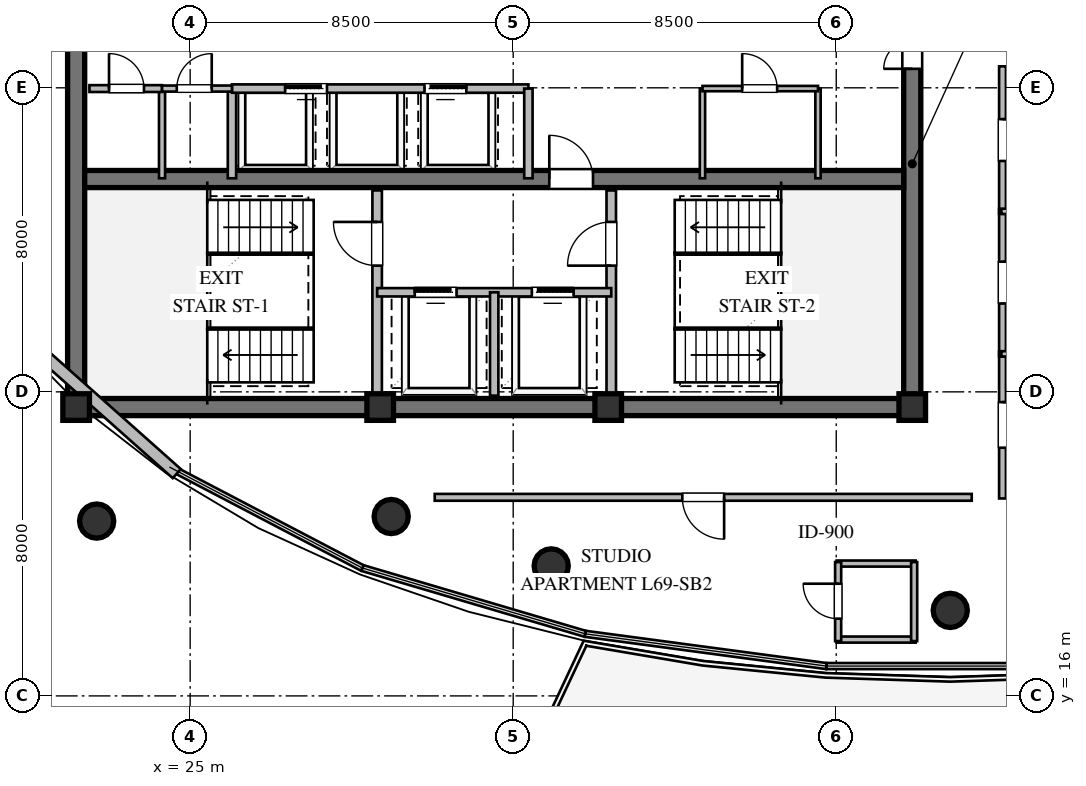
"""IFC4 building model, lengths in metres.
Left out: names, types, materials, properties, quantities, classifications, styles, units other than length and angle.
Written with IfcOpenShell. Run it as: python <this file> out.ifc"""

import sys

from ifc_helpers import new_model, si_unit, direction, frame, frame_2d, origin, origin_2d, place, context, subcontext, project, spatial, rectangle, circle, extrude, element, fill, save


model = new_model("IFC4")
c1 = context("Model", 3, precision=1e-05, world=origin(), true_north=direction((0.0, 1.0)))
c2 = subcontext(c1, "Body", "Model", "MODEL_VIEW")
j1 = project(units=[si_unit("LENGTHUNIT", "METRE"), si_unit("PLANEANGLEUNIT", "RADIAN")], contexts=[c1])
p1 = place(None, origin())
s1 = spatial("IfcSite", under=j1, at=p1, CompositionType="ELEMENT")
p2 = place(p1, origin())
s2 = spatial("IfcBuilding", under=s1, at=p2, CompositionType="ELEMENT")
p3 = place(p2, frame((0.0, 0.0, 262.4)))
s3 = spatial("IfcBuildingStorey", under=s2, at=p3, CompositionType="ELEMENT", Elevation=262.4)
p4 = place(p3, frame((21.775, 23.6, 0.0), z_axis=(0.0, 0.0, 1.0), x_axis=(1.0, 0.0, 0.0)))
e1 = element("IfcWall", 1, at=p4, inside=s3, PredefinedType="SHEAR", context=c2, shape_type="SweptSolid", body=[
    extrude(rectangle(XDim=22.45, YDim=0.45, at=frame_2d((11.225, 0.0))), origin(), (0.0, 0.0, 1.0), 3.56),
])
p5 = place(p3, frame((22.0, 23.825, 0.0), z_axis=(0.0, 0.0, 1.0), x_axis=(0.0, 1.0, 0.0)))
e2 = element("IfcWall", 2, at=p5, inside=s3, PredefinedType="SHEAR", context=c2, shape_type="SweptSolid", body=[
    extrude(rectangle(XDim=12.35, YDim=0.45, at=frame_2d((6.175, 0.0))), origin(), (0.0, 0.0, 1.0), 3.56),
])
p6 = place(p3, frame((44.0, 23.825, 0.0), z_axis=(0.0, 0.0, 1.0), x_axis=(0.0, 1.0, 0.0)))
e3 = element("IfcWall", 3, at=p6, inside=s3, PredefinedType="SHEAR", context=c2, shape_type="SweptSolid", body=[
    extrude(rectangle(XDim=12.35, YDim=0.45, at=frame_2d((6.175, 0.0))), origin(), (0.0, 0.0, 1.0), 3.56),
])
p7 = place(p6, frame((8.675, 0.0, 0.0)))
e4 = element("IfcOpeningElement", 4, at=p7, cuts=e3, PredefinedType="OPENING", context=c2, shape_type="SweptSolid", body=[
    extrude(rectangle(XDim=1.5, YDim=2.15, at=frame_2d((0.75, 1.075))), frame((0.0, 0.235, 0.0), z_axis=(0.0, -1.0, 0.0), x_axis=(1.0, 0.0, 0.0)), (0.0, 0.0, 1.0), 0.47),
])
p8 = place(p3, frame((22.225, 29.6, 0.0), z_axis=(0.0, 0.0, 1.0), x_axis=(1.0, 0.0, 0.0)))
e5 = element("IfcWall", 5, at=p8, inside=s3, PredefinedType="SHEAR", context=c2, shape_type="SweptSolid", body=[
    extrude(rectangle(XDim=21.55, YDim=0.45, at=frame_2d((10.775, 0.0))), origin(), (0.0, 0.0, 1.0), 3.56),
])
p9 = place(p8, frame((12.225, 0.0, 0.0)))
e6 = element("IfcOpeningElement", 6, at=p9, cuts=e5, PredefinedType="OPENING", context=c2, shape_type="SweptSolid", body=[
    extrude(rectangle(XDim=1.15, YDim=2.1, at=frame_2d((0.575, 1.05))), frame((0.0, 0.235, 0.0), z_axis=(0.0, -1.0, 0.0), x_axis=(1.0, 0.0, 0.0)), (0.0, 0.0, 1.0), 0.47),
])
for number, where, z_axis, x_axis in (
    (7, (22.0, 23.6, 0.0), (0.0, 0.0, 1.0), (1.0, 0.0, 0.0)),
    (8, (30.0, 23.6, 0.0), (0.0, 0.0, 1.0), (1.0, 0.0, 0.0)),
    (9, (36.0, 23.6, 0.0), (0.0, 0.0, 1.0), (1.0, 0.0, 0.0)),
    (10, (44.0, 23.6, 0.0), (0.0, 0.0, 1.0), (1.0, 0.0, 0.0)),
):
    element("IfcColumn", number, at=place(p3, frame(where, z_axis=z_axis, x_axis=x_axis)), inside=s3, PredefinedType="COLUMN", context=c2, shape_type="SweptSolid", body=[
        extrude(rectangle(XDim=0.7, YDim=0.7, at=origin_2d()), origin(), (0.0, 0.0, 1.0), 3.8),
    ])
for number, where, z_axis, x_axis in (
    (11, (22.54, 20.6, 0.0), (0.0, 0.0, 1.0), (1.0, 0.0, 0.0)),
    (12, (30.29, 20.72, 0.0), (0.0, 0.0, 1.0), (1.0, 0.0, 0.0)),
    (13, (34.5, 19.42, 0.0), (0.0, 0.0, 1.0), (1.0, 0.0, 0.0)),
    (14, (45.0, 18.25, 0.0), (0.0, 0.0, 1.0), (1.0, 0.0, 0.0)),
):
    element("IfcColumn", number, at=place(p3, frame(where, z_axis=z_axis, x_axis=x_axis)), inside=s3, PredefinedType="COLUMN", context=c2, shape_type="SweptSolid", body=[
        extrude(circle(Radius=0.45, at=origin_2d()), origin(), (0.0, 0.0, 1.0), 3.8),
    ])
p10 = place(p3, frame((24.648, 21.849, 0.0), z_axis=(0.0, 0.0, 1.0), x_axis=(-0.747068410291, 0.664747162721, 0.0)))
e15 = element("IfcWall", 15, at=p10, inside=s3, PredefinedType="STANDARD", context=c2, shape_type="SweptSolid", body=[
    extrude(rectangle(XDim=5.928, YDim=0.32, at=frame_2d((2.964, 0.0))), origin(), (0.0, 0.0, 1.0), 2.35),
])
p11 = place(p3, frame((29.92, 23.9, 0.0), z_axis=(0.0, 0.0, 1.0), x_axis=(0.0, 1.0, 0.0)))
e16 = element("IfcWall", 16, at=p11, inside=s3, PredefinedType="SOLIDWALL", context=c2, shape_type="SweptSolid", body=[
    extrude(rectangle(XDim=5.4, YDim=0.25, at=frame_2d((2.7, 0.0))), origin(), (0.0, 0.0, 1.0), 3.09),
])
p12 = place(p11, frame((3.421, 0.0, 0.0)))
e17 = element("IfcOpeningElement", 17, at=p12, cuts=e16, PredefinedType="OPENING", context=c2, shape_type="SweptSolid", body=[
    extrude(rectangle(XDim=1.15, YDim=2.1, at=frame_2d((0.575, 1.05))), frame((0.0, 0.135, 0.0), z_axis=(0.0, -1.0, 0.0), x_axis=(1.0, 0.0, 0.0)), (0.0, 0.0, 1.0), 0.27),
])
p13 = place(p3, frame((36.08, 23.9, 0.0), z_axis=(0.0, 0.0, 1.0), x_axis=(0.0, 1.0, 0.0)))
e18 = element("IfcWall", 18, at=p13, inside=s3, PredefinedType="SOLIDWALL", context=c2, shape_type="SweptSolid", body=[
    extrude(rectangle(XDim=5.4, YDim=0.25, at=frame_2d((2.7, 0.0))), origin(), (0.0, 0.0, 1.0), 3.56),
])
p14 = place(p13, frame((3.421, 0.0, 0.0)))
e19 = element("IfcOpeningElement", 19, at=p14, cuts=e18, PredefinedType="OPENING", context=c2, shape_type="SweptSolid", body=[
    extrude(rectangle(XDim=1.15, YDim=2.1, at=frame_2d((0.575, 1.05))), frame((0.0, 0.135, 0.0), z_axis=(0.0, -1.0, 0.0), x_axis=(1.0, 0.0, 0.0)), (0.0, 0.0, 1.0), 0.27),
])
p15 = place(p3, frame((29.92, 26.62, 0.0), z_axis=(0.0, 0.0, 1.0), x_axis=(1.0, 0.0, 0.0)))
e20 = element("IfcWall", 20, at=p15, inside=s3, PredefinedType="SOLIDWALL", context=c2, shape_type="SweptSolid", body=[
    extrude(rectangle(XDim=6.16, YDim=0.22, at=frame_2d((3.08, 0.0))), origin(), (0.0, 0.0, 1.0), 3.56),
])
p16 = place(p15, frame((0.99, 0.0, 0.0)))
e21 = element("IfcOpeningElement", 21, at=p16, cuts=e20, PredefinedType="OPENING", context=c2, shape_type="SweptSolid", body=[
    extrude(rectangle(XDim=1.1, YDim=2.1, at=frame_2d((0.55, 1.05))), frame((0.0, 0.12, 0.0), z_axis=(0.0, -1.0, 0.0), x_axis=(1.0, 0.0, 0.0)), (0.0, 0.0, 1.0), 0.24),
])
p17 = place(p15, frame((4.07, 0.0, 0.0)))
e22 = element("IfcOpeningElement", 22, at=p17, cuts=e20, PredefinedType="OPENING", context=c2, shape_type="SweptSolid", body=[
    extrude(rectangle(XDim=1.1, YDim=2.1, at=frame_2d((0.55, 1.05))), frame((0.0, 0.12, 0.0), z_axis=(0.0, -1.0, 0.0), x_axis=(1.0, 0.0, 0.0)), (0.0, 0.0, 1.0), 0.24),
])
p18 = place(p3, frame((33.0, 23.9, 0.0), z_axis=(0.0, 0.0, 1.0), x_axis=(0.0, 1.0, 0.0)))
e23 = element("IfcWall", 23, at=p18, inside=s3, PredefinedType="SOLIDWALL", context=c2, shape_type="SweptSolid", body=[
    extrude(rectangle(XDim=2.72, YDim=0.22, at=frame_2d((1.36, 0.0))), origin(), (0.0, 0.0, 1.0), 3.56),
])
p19 = place(p3, frame((26.1, 29.62, 0.0), z_axis=(0.0, 0.0, 1.0), x_axis=(0.0, 1.0, 0.0)))
e24 = element("IfcWall", 24, at=p19, inside=s3, PredefinedType="SOLIDWALL", context=c2, shape_type="SweptSolid", body=[
    extrude(rectangle(XDim=2.36, YDim=0.22, at=frame_2d((1.18, 0.0))), origin(), (0.0, 0.0, 1.0), 3.56),
])
p20 = place(p3, frame((26.1, 31.98, 0.0), z_axis=(0.0, 0.0, 1.0), x_axis=(1.0, 0.0, 0.0)))
e25 = element("IfcWall", 25, at=p20, inside=s3, PredefinedType="SOLIDWALL", context=c2, shape_type="SweptSolid", body=[
    extrude(rectangle(XDim=7.8, YDim=0.22, at=frame_2d((3.9, 0.0))), origin(), (0.0, 0.0, 1.0), 3.56),
])
p21 = place(p20, frame((1.4, 0.0, 0.0)))
e26 = element("IfcOpeningElement", 26, at=p21, cuts=e25, PredefinedType="OPENING", context=c2, shape_type="SweptSolid", body=[
    extrude(rectangle(XDim=1.1, YDim=2.1, at=frame_2d((0.55, 1.05))), frame((0.0, 0.12, 0.0), z_axis=(0.0, -1.0, 0.0), x_axis=(1.0, 0.0, 0.0)), (0.0, 0.0, 1.0), 0.24),
])
p22 = place(p20, frame((5.066, 0.0, 0.0)))
e27 = element("IfcOpeningElement", 27, at=p22, cuts=e25, PredefinedType="OPENING", context=c2, shape_type="SweptSolid", body=[
    extrude(rectangle(XDim=1.1, YDim=2.1, at=frame_2d((0.55, 1.05))), frame((0.0, 0.12, 0.0), z_axis=(0.0, -1.0, 0.0), x_axis=(1.0, 0.0, 0.0)), (0.0, 0.0, 1.0), 0.24),
])
p23 = place(p3, frame((33.9, 29.62, 0.0), z_axis=(0.0, 0.0, 1.0), x_axis=(0.0, 1.0, 0.0)))
e28 = element("IfcWall", 28, at=p23, inside=s3, PredefinedType="SOLIDWALL", context=c2, shape_type="SweptSolid", body=[
    extrude(rectangle(XDim=2.36, YDim=0.22, at=frame_2d((1.18, 0.0))), origin(), (0.0, 0.0, 1.0), 3.56),
])
p24 = place(p3, frame((24.26, 29.62, 0.0), z_axis=(0.0, 0.0, 1.0), x_axis=(0.0, 1.0, 0.0)))
e29 = element("IfcWall", 29, at=p24, inside=s3, PredefinedType="PLUMBINGWALL", context=c2, shape_type="SweptSolid", body=[
    extrude(rectangle(XDim=2.36, YDim=0.16, at=frame_2d((1.18, 0.0))), origin(), (0.0, 0.0, 1.0), 3.56),
])
p25 = place(p3, frame((22.35, 31.98, 0.0), z_axis=(0.0, 0.0, 1.0), x_axis=(1.0, 0.0, 0.0)))
e30 = element("IfcWall", 30, at=p25, inside=s3, PredefinedType="PARTITIONING", context=c2, shape_type="SweptSolid", body=[
    extrude(rectangle(XDim=1.91, YDim=0.18, at=frame_2d((0.955, 0.0))), origin(), (0.0, 0.0, 1.0), 3.56),
])
p26 = place(p25, frame((0.515, 0.0, 0.0)))
e31 = element("IfcOpeningElement", 31, at=p26, cuts=e30, PredefinedType="OPENING", context=c2, shape_type="SweptSolid", body=[
    extrude(rectangle(XDim=0.92, YDim=2.1, at=frame_2d((0.46, 1.05))), frame((0.0, 0.1, 0.0), z_axis=(0.0, -1.0, 0.0), x_axis=(1.0, 0.0, 0.0)), (0.0, 0.0, 1.0), 0.2),
])
p27 = place(p3, frame((24.26, 31.98, 0.0), z_axis=(0.0, 0.0, 1.0), x_axis=(1.0, 0.0, 0.0)))
e32 = element("IfcWall", 32, at=p27, inside=s3, PredefinedType="PLUMBINGWALL", context=c2, shape_type="SweptSolid", body=[
    extrude(rectangle(XDim=1.84, YDim=0.16, at=frame_2d((0.92, 0.0))), origin(), (0.0, 0.0, 1.0), 3.56),
])
p28 = place(p27, frame((0.388, 0.0, 0.0)))
e33 = element("IfcOpeningElement", 33, at=p28, cuts=e32, PredefinedType="OPENING", context=c2, shape_type="SweptSolid", body=[
    extrude(rectangle(XDim=0.92, YDim=2.1, at=frame_2d((0.46, 1.05))), frame((0.0, 0.09, 0.0), z_axis=(0.0, -1.0, 0.0), x_axis=(1.0, 0.0, 0.0)), (0.0, 0.0, 1.0), 0.18),
])
for number, where, z_axis, x_axis in (
    (34, (38.48, 29.62, 0.0), (0.0, 0.0, 1.0), (0.0, 1.0, 0.0)),
    (35, (41.52, 29.62, 0.0), (0.0, 0.0, 1.0), (0.0, 1.0, 0.0)),
):
    element("IfcWall", number, at=place(p3, frame(where, z_axis=z_axis, x_axis=x_axis)), inside=s3, PredefinedType="PARTITIONING", context=c2, shape_type="SweptSolid", body=[
        extrude(rectangle(XDim=2.36, YDim=0.14, at=frame_2d((1.18, 0.0))), origin(), (0.0, 0.0, 1.0), 3.56),
    ])
p29 = place(p3, frame((38.48, 31.98, 0.0), z_axis=(0.0, 0.0, 1.0), x_axis=(1.0, 0.0, 0.0)))
e36 = element("IfcWall", 36, at=p29, inside=s3, PredefinedType="PARTITIONING", context=c2, shape_type="SweptSolid", body=[
    extrude(rectangle(XDim=3.04, YDim=0.14, at=frame_2d((1.52, 0.0))), origin(), (0.0, 0.0, 1.0), 3.56),
])
p30 = place(p29, frame((1.045, 0.0, 0.0)))
e37 = element("IfcOpeningElement", 37, at=p30, cuts=e36, PredefinedType="OPENING", context=c2, shape_type="SweptSolid", body=[
    extrude(rectangle(XDim=0.92, YDim=2.1, at=frame_2d((0.46, 1.05))), frame((0.0, 0.08, 0.0), z_axis=(0.0, -1.0, 0.0), x_axis=(1.0, 0.0, 0.0)), (0.0, 0.0, 1.0), 0.16),
])
for number, where, z_axis, x_axis in (
    (38, (42.01, 17.482, 0.0), (0.0, 0.0, 1.0), (1.0, 0.0, 0.0)),
    (39, (42.01, 19.482, 0.0), (0.0, 0.0, 1.0), (1.0, 0.0, 0.0)),
):
    element("IfcWall", number, at=place(p3, frame(where, z_axis=z_axis, x_axis=x_axis)), inside=s3, PredefinedType="PLUMBINGWALL", context=c2, shape_type="SweptSolid", body=[
        extrude(rectangle(XDim=2.08, YDim=0.16, at=frame_2d((1.04, 0.0))), origin(), (0.0, 0.0, 1.0), 3.56),
    ])
p31 = place(p3, frame((42.05, 17.442, 0.0), z_axis=(0.0, 0.0, 1.0), x_axis=(0.0, 1.0, 0.0)))
e40 = element("IfcWall", 40, at=p31, inside=s3, PredefinedType="PLUMBINGWALL", context=c2, shape_type="SweptSolid", body=[
    extrude(rectangle(XDim=2.08, YDim=0.16, at=frame_2d((1.04, 0.0))), origin(), (0.0, 0.0, 1.0), 3.56),
])
p32 = place(p31, frame((0.59, 0.0, 0.0)))
e41 = element("IfcOpeningElement", 41, at=p32, cuts=e40, PredefinedType="OPENING", context=c2, shape_type="SweptSolid", body=[
    extrude(rectangle(XDim=0.92, YDim=2.1, at=frame_2d((0.46, 1.05))), frame((0.0, 0.09, 0.0), z_axis=(0.0, -1.0, 0.0), x_axis=(1.0, 0.0, 0.0)), (0.0, 0.0, 1.0), 0.18),
])
p33 = place(p3, frame((44.05, 17.442, 0.0), z_axis=(0.0, 0.0, 1.0), x_axis=(0.0, 1.0, 0.0)))
e42 = element("IfcWall", 42, at=p33, inside=s3, PredefinedType="PLUMBINGWALL", context=c2, shape_type="SweptSolid", body=[
    extrude(rectangle(XDim=2.08, YDim=0.16, at=frame_2d((1.04, 0.0))), origin(), (0.0, 0.0, 1.0), 3.56),
])
p34 = place(p3, frame((46.375, 25.065, 0.0), z_axis=(0.0, 0.0, 1.0), x_axis=(0.0, -1.0, 0.0)))
e43 = element("IfcWall", 43, at=p34, inside=s3, PredefinedType="PARTITIONING", context=c2, shape_type="SweptSolid", body=[
    extrude(rectangle(XDim=3.87, YDim=0.18, at=frame_2d((1.935, 0.0))), origin(), (0.0, 0.0, 1.0), 3.56),
])
p35 = place(p34, frame((1.335, 0.0, 0.0)))
e44 = element("IfcOpeningElement", 44, at=p35, cuts=e43, PredefinedType="OPENING", context=c2, shape_type="SweptSolid", body=[
    extrude(rectangle(XDim=1.2, YDim=2.15, at=frame_2d((0.6, 1.075))), frame((0.0, 0.1, 0.0), z_axis=(0.0, -1.0, 0.0), x_axis=(1.0, 0.0, 0.0)), (0.0, 0.0, 1.0), 0.2),
])
p36 = place(p3, frame((46.375, 28.815, 0.0), z_axis=(0.0, 0.0, 1.0), x_axis=(0.0, -1.0, 0.0)))
e45 = element("IfcWall", 45, at=p36, inside=s3, PredefinedType="PARTITIONING", context=c2, shape_type="SweptSolid", body=[
    extrude(rectangle(XDim=3.88, YDim=0.18, at=frame_2d((1.94, 0.0))), origin(), (0.0, 0.0, 1.0), 3.56),
])
p37 = place(p36, frame((1.39, 0.0, 0.0)))
e46 = element("IfcOpeningElement", 46, at=p37, cuts=e45, PredefinedType="OPENING", context=c2, shape_type="SweptSolid", body=[
    extrude(rectangle(XDim=1.1, YDim=2.1, at=frame_2d((0.55, 1.05))), frame((0.0, 0.1, 0.0), z_axis=(0.0, -1.0, 0.0), x_axis=(1.0, 0.0, 0.0)), (0.0, 0.0, 1.0), 0.2),
])
p38 = place(p3, frame((46.375, 32.565, 0.0), z_axis=(0.0, 0.0, 1.0), x_axis=(0.0, -1.0, 0.0)))
e47 = element("IfcWall", 47, at=p38, inside=s3, PredefinedType="PARTITIONING", context=c2, shape_type="SweptSolid", body=[
    extrude(rectangle(XDim=3.88, YDim=0.18, at=frame_2d((1.94, 0.0))), origin(), (0.0, 0.0, 1.0), 3.56),
])
p39 = place(p38, frame((1.39, 0.0, 0.0)))
e48 = element("IfcOpeningElement", 48, at=p39, cuts=e47, PredefinedType="OPENING", context=c2, shape_type="SweptSolid", body=[
    extrude(rectangle(XDim=1.1, YDim=2.1, at=frame_2d((0.55, 1.05))), frame((0.0, 0.1, 0.0), z_axis=(0.0, -1.0, 0.0), x_axis=(1.0, 0.0, 0.0)), (0.0, 0.0, 1.0), 0.2),
])
p40 = place(p3, frame((45.565, 21.225, 0.0), z_axis=(0.0, 0.0, 1.0), x_axis=(-1.0, 0.0, 0.0)))
e49 = element("IfcWall", 49, at=p40, inside=s3, PredefinedType="PARTITIONING", context=c2, shape_type="SweptSolid", body=[
    extrude(rectangle(XDim=14.13, YDim=0.18, at=frame_2d((7.065, 0.0))), origin(), (0.0, 0.0, 1.0), 3.196),
])
p41 = place(p40, frame((6.515, 0.0, 0.0)))
e50 = element("IfcOpeningElement", 50, at=p41, cuts=e49, PredefinedType="OPENING", context=c2, shape_type="SweptSolid", body=[
    extrude(rectangle(XDim=1.1, YDim=2.1, at=frame_2d((0.55, 1.05))), frame((0.0, 0.1, 0.0), z_axis=(0.0, -1.0, 0.0), x_axis=(1.0, 0.0, 0.0)), (0.0, 0.0, 1.0), 0.2),
])
p42 = place(p3, frame((46.345, 25.0, 0.0), z_axis=(0.0, 0.0, 1.0), x_axis=(1.0, 0.0, 0.0)))
e51 = element("IfcWall", 51, at=p42, inside=s3, PredefinedType="PARTITIONING", context=c2, shape_type="SweptSolid", body=[
    extrude(rectangle(XDim=22.539, YDim=0.14, at=frame_2d((11.269, 0.0))), origin(), (0.0, 0.0, 1.0), 3.56),
])
p43 = place(p3, frame((46.345, 28.75, 0.0), z_axis=(0.0, 0.0, 1.0), x_axis=(1.0, 0.0, 0.0)))
e52 = element("IfcWall", 52, at=p43, inside=s3, PredefinedType="PARTITIONING", context=c2, shape_type="SweptSolid", body=[
    extrude(rectangle(XDim=25.721, YDim=0.14, at=frame_2d((12.86, 0.0))), origin(), (0.0, 0.0, 1.0), 3.56),
])
p44 = place(p12, origin())
e53 = element("IfcDoor", 53, at=p44, inside=s3, OperationType="SINGLE_SWING_RIGHT", PredefinedType="DOOR", context=c2, shape_type="SweptSolid", body=[
    extrude(rectangle(XDim=1.15, YDim=2.1, at=frame_2d((0.575, 1.05))), frame((0.0, 0.025, 0.0), z_axis=(0.0, -1.0, 0.0), x_axis=(1.0, 0.0, 0.0)), (0.0, 0.0, 1.0), 0.05),
])
fill(e17, e53)
p45 = place(p14, origin())
e54 = element("IfcDoor", 54, at=p45, inside=s3, OperationType="SINGLE_SWING_LEFT", PredefinedType="DOOR", context=c2, shape_type="SweptSolid", body=[
    extrude(rectangle(XDim=1.15, YDim=2.1, at=frame_2d((0.575, 1.05))), frame((0.0, 0.025, 0.0), z_axis=(0.0, -1.0, 0.0), x_axis=(1.0, 0.0, 0.0)), (0.0, 0.0, 1.0), 0.05),
])
fill(e19, e54)
p46 = place(p16, origin())
e55 = element("IfcDoor", 55, at=p46, inside=s3, OperationType="SLIDING_TO_LEFT", PredefinedType="DOOR", context=c2, shape_type="SweptSolid", body=[
    extrude(rectangle(XDim=1.1, YDim=2.1, at=frame_2d((0.55, 1.05))), frame((0.0, 0.025, 0.0), z_axis=(0.0, -1.0, 0.0), x_axis=(1.0, 0.0, 0.0)), (0.0, 0.0, 1.0), 0.05),
])
fill(e21, e55)
p47 = place(p17, origin())
e56 = element("IfcDoor", 56, at=p47, inside=s3, OperationType="SLIDING_TO_RIGHT", PredefinedType="DOOR", context=c2, shape_type="SweptSolid", body=[
    extrude(rectangle(XDim=1.1, YDim=2.1, at=frame_2d((0.55, 1.05))), frame((0.0, 0.025, 0.0), z_axis=(0.0, -1.0, 0.0), x_axis=(1.0, 0.0, 0.0)), (0.0, 0.0, 1.0), 0.05),
])
fill(e22, e56)
p48 = place(p9, origin())
e57 = element("IfcDoor", 57, at=p48, inside=s3, OperationType="SINGLE_SWING_LEFT", PredefinedType="DOOR", context=c2, shape_type="SweptSolid", body=[
    extrude(rectangle(XDim=1.15, YDim=2.1, at=frame_2d((0.575, 1.05))), frame((0.0, 0.025, 0.0), z_axis=(0.0, -1.0, 0.0), x_axis=(1.0, 0.0, 0.0)), (0.0, 0.0, 1.0), 0.05),
])
fill(e6, e57)
p49 = place(p7, origin())
e58 = element("IfcDoor", 58, at=p49, inside=s3, OperationType="DOUBLE_DOOR_SINGLE_SWING", PredefinedType="DOOR", context=c2, shape_type="SweptSolid", body=[
    extrude(rectangle(XDim=1.5, YDim=2.15, at=frame_2d((0.75, 1.075))), frame((0.0, 0.025, 0.0), z_axis=(0.0, -1.0, 0.0), x_axis=(1.0, 0.0, 0.0)), (0.0, 0.0, 1.0), 0.05),
])
fill(e4, e58)
p50 = place(p21, origin())
e59 = element("IfcDoor", 59, at=p50, inside=s3, OperationType="SLIDING_TO_LEFT", PredefinedType="DOOR", context=c2, shape_type="SweptSolid", body=[
    extrude(rectangle(XDim=1.1, YDim=2.1, at=frame_2d((0.55, 1.05))), frame((0.0, 0.025, 0.0), z_axis=(0.0, -1.0, 0.0), x_axis=(1.0, 0.0, 0.0)), (0.0, 0.0, 1.0), 0.05),
])
fill(e26, e59)
p51 = place(p22, origin())
e60 = element("IfcDoor", 60, at=p51, inside=s3, OperationType="SLIDING_TO_RIGHT", PredefinedType="DOOR", context=c2, shape_type="SweptSolid", body=[
    extrude(rectangle(XDim=1.1, YDim=2.1, at=frame_2d((0.55, 1.05))), frame((0.0, 0.025, 0.0), z_axis=(0.0, -1.0, 0.0), x_axis=(1.0, 0.0, 0.0)), (0.0, 0.0, 1.0), 0.05),
])
fill(e27, e60)
p52 = place(p26, origin())
e61 = element("IfcDoor", 61, at=p52, inside=s3, OperationType="SINGLE_SWING_LEFT", PredefinedType="DOOR", context=c2, shape_type="SweptSolid", body=[
    extrude(rectangle(XDim=0.92, YDim=2.1, at=frame_2d((0.46, 1.05))), frame((0.0, 0.025, 0.0), z_axis=(0.0, -1.0, 0.0), x_axis=(1.0, 0.0, 0.0)), (0.0, 0.0, 1.0), 0.05),
])
fill(e31, e61)
p53 = place(p28, origin())
e62 = element("IfcDoor", 62, at=p53, inside=s3, OperationType="SINGLE_SWING_RIGHT", PredefinedType="DOOR", context=c2, shape_type="SweptSolid", body=[
    extrude(rectangle(XDim=0.92, YDim=2.1, at=frame_2d((0.46, 1.05))), frame((0.0, 0.025, 0.0), z_axis=(0.0, -1.0, 0.0), x_axis=(1.0, 0.0, 0.0)), (0.0, 0.0, 1.0), 0.05),
])
fill(e33, e62)
p54 = place(p30, origin())
e63 = element("IfcDoor", 63, at=p54, inside=s3, OperationType="SINGLE_SWING_LEFT", PredefinedType="DOOR", context=c2, shape_type="SweptSolid", body=[
    extrude(rectangle(XDim=0.92, YDim=2.1, at=frame_2d((0.46, 1.05))), frame((0.0, 0.025, 0.0), z_axis=(0.0, -1.0, 0.0), x_axis=(1.0, 0.0, 0.0)), (0.0, 0.0, 1.0), 0.05),
])
fill(e37, e63)
p55 = place(p32, origin())
e64 = element("IfcDoor", 64, at=p55, inside=s3, OperationType="SINGLE_SWING_RIGHT", PredefinedType="DOOR", context=c2, shape_type="SweptSolid", body=[
    extrude(rectangle(XDim=0.92, YDim=2.1, at=frame_2d((0.46, 1.05))), frame((0.0, 0.025, 0.0), z_axis=(0.0, -1.0, 0.0), x_axis=(1.0, 0.0, 0.0)), (0.0, 0.0, 1.0), 0.05),
])
fill(e41, e64)
p56 = place(p35, origin())
e65 = element("IfcDoor", 65, at=p56, inside=s3, OperationType="SINGLE_SWING_LEFT", PredefinedType="DOOR", context=c2, shape_type="SweptSolid", body=[
    extrude(rectangle(XDim=1.2, YDim=2.15, at=frame_2d((0.6, 1.075))), frame((0.0, 0.025, 0.0), z_axis=(0.0, -1.0, 0.0), x_axis=(1.0, 0.0, 0.0)), (0.0, 0.0, 1.0), 0.05),
])
fill(e44, e65)
p57 = place(p37, origin())
e66 = element("IfcDoor", 66, at=p57, inside=s3, OperationType="SINGLE_SWING_LEFT", PredefinedType="DOOR", context=c2, shape_type="SweptSolid", body=[
    extrude(rectangle(XDim=1.1, YDim=2.1, at=frame_2d((0.55, 1.05))), frame((0.0, 0.025, 0.0), z_axis=(0.0, -1.0, 0.0), x_axis=(1.0, 0.0, 0.0)), (0.0, 0.0, 1.0), 0.05),
])
fill(e46, e66)
p58 = place(p39, origin())
e67 = element("IfcDoor", 67, at=p58, inside=s3, OperationType="SINGLE_SWING_LEFT", PredefinedType="DOOR", context=c2, shape_type="SweptSolid", body=[
    extrude(rectangle(XDim=1.1, YDim=2.1, at=frame_2d((0.55, 1.05))), frame((0.0, 0.025, 0.0), z_axis=(0.0, -1.0, 0.0), x_axis=(1.0, 0.0, 0.0)), (0.0, 0.0, 1.0), 0.05),
])
fill(e48, e67)
p59 = place(p41, origin())
e68 = element("IfcDoor", 68, at=p59, inside=s3, OperationType="SINGLE_SWING_LEFT", PredefinedType="DOOR", context=c2, shape_type="SweptSolid", body=[
    extrude(rectangle(XDim=1.1, YDim=2.1, at=frame_2d((0.55, 1.05))), frame((0.0, 0.025, 0.0), z_axis=(0.0, -1.0, 0.0), x_axis=(1.0, 0.0, 0.0)), (0.0, 0.0, 1.0), 0.05),
])
fill(e50, e68)
save(model, sys.argv[1])
